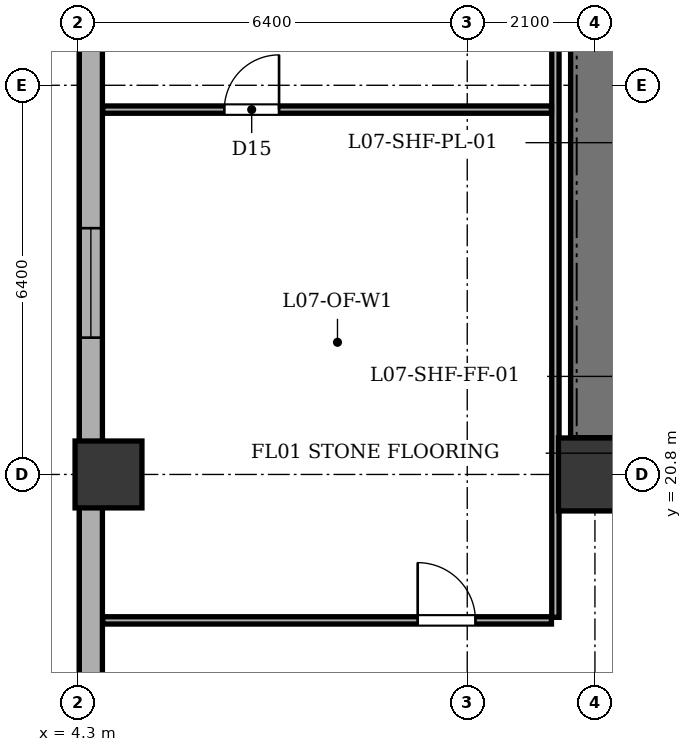
"""IFC4 building model, lengths in metres.
Left out: names, types, materials, properties, quantities, classifications, styles, units other than length and angle.
Written with IfcOpenShell. Run it as: python <this file> out.ifc"""

import sys

from ifc_helpers import new_model, si_unit, direction, frame, frame_2d, origin, origin_2d, place, context, subcontext, project, spatial, rectangle, extrude, element, fill, save


model = new_model("IFC4")
c1 = context("Model", 3, precision=1e-05, world=origin(), true_north=direction((0.0, 1.0)))
c2 = subcontext(c1, "Body", "Model", "MODEL_VIEW")
j1 = project(units=[si_unit("LENGTHUNIT", "METRE"), si_unit("PLANEANGLEUNIT", "RADIAN")], contexts=[c1])
p1 = place(None, origin())
s1 = spatial("IfcSite", under=j1, at=p1, CompositionType="ELEMENT")
p2 = place(p1, origin())
s2 = spatial("IfcBuilding", under=s1, at=p2, CompositionType="ELEMENT")
p3 = place(p2, frame((0.0, 0.0, 32.1)))
s3 = spatial("IfcBuildingStorey", under=s2, at=p3, CompositionType="ELEMENT", Elevation=32.1)
p4 = place(p3, frame((12.8, 20.8, 0.0), z_axis=(0.0, 0.0, 1.0), x_axis=(1.0, 0.0, 0.0)))
e1 = element("IfcColumn", 1, at=p4, inside=s3, PredefinedType="COLUMN", context=c2, shape_type="SweptSolid", body=[
    extrude(rectangle(XDim=1.2, YDim=1.2, at=origin_2d()), origin(), (0.0, 0.0, 1.0), 3.9),
])
p5 = place(p3, frame((4.8, 20.8, 0.0), z_axis=(0.0, 0.0, 1.0), x_axis=(1.0, 0.0, 0.0)))
e2 = element("IfcColumn", 2, at=p5, inside=s3, PredefinedType="COLUMN", context=c2, shape_type="SweptSolid", body=[
    extrude(rectangle(XDim=1.1, YDim=1.1, at=origin_2d()), origin(), (0.0, 0.0, 1.0), 3.9),
])
p6 = place(p3, frame((4.51, 6.5, 0.0), z_axis=(0.0, 0.0, 1.0), x_axis=(0.0, 1.0, 0.0)))
e3 = element("IfcWall", 3, at=p6, inside=s3, PredefinedType="STANDARD", context=c2, shape_type="SweptSolid", body=[
    extrude(rectangle(XDim=35.0, YDim=0.38, at=frame_2d((17.5, 0.0))), origin(), (0.0, 0.0, 1.0), 3.135),
])
p7 = place(p6, frame((2.693, 0.0, 0.8)))
e4 = element("IfcOpeningElement", 4, at=p7, cuts=e3, PredefinedType="OPENING", context=c2, shape_type="SweptSolid", body=[
    extrude(rectangle(XDim=1.8, YDim=1.9, at=frame_2d((0.9, 0.95))), frame((0.0, 0.2, 0.0), z_axis=(0.0, -1.0, 0.0), x_axis=(1.0, 0.0, 0.0)), (0.0, 0.0, 1.0), 0.4),
])
p8 = place(p6, frame((7.457, 0.0, 0.8)))
e5 = element("IfcOpeningElement", 5, at=p8, cuts=e3, PredefinedType="OPENING", context=c2, shape_type="SweptSolid", body=[
    extrude(rectangle(XDim=2.4, YDim=1.9, at=frame_2d((1.2, 0.95))), frame((0.0, 0.2, 0.0), z_axis=(0.0, -1.0, 0.0), x_axis=(1.0, 0.0, 0.0)), (0.0, 0.0, 1.0), 0.4),
])
p9 = place(p6, frame((16.55, 0.0, 0.8)))
e6 = element("IfcOpeningElement", 6, at=p9, cuts=e3, PredefinedType="OPENING", context=c2, shape_type="SweptSolid", body=[
    extrude(rectangle(XDim=1.8, YDim=1.9, at=frame_2d((0.9, 0.95))), frame((0.0, 0.2, 0.0), z_axis=(0.0, -1.0, 0.0), x_axis=(1.0, 0.0, 0.0)), (0.0, 0.0, 1.0), 0.4),
])
p10 = place(p6, frame((21.33, 0.0, 0.8)))
e7 = element("IfcOpeningElement", 7, at=p10, cuts=e3, PredefinedType="OPENING", context=c2, shape_type="SweptSolid", body=[
    extrude(rectangle(XDim=1.8, YDim=1.9, at=frame_2d((0.9, 0.95))), frame((0.0, 0.2, 0.0), z_axis=(0.0, -1.0, 0.0), x_axis=(1.0, 0.0, 0.0)), (0.0, 0.0, 1.0), 0.4),
])
p11 = place(p6, frame((23.97, 0.0, 0.8)))
e8 = element("IfcOpeningElement", 8, at=p11, cuts=e3, PredefinedType="OPENING", context=c2, shape_type="SweptSolid", body=[
    extrude(rectangle(XDim=1.8, YDim=1.9, at=frame_2d((0.9, 0.95))), frame((0.0, 0.2, 0.0), z_axis=(0.0, -1.0, 0.0), x_axis=(1.0, 0.0, 0.0)), (0.0, 0.0, 1.0), 0.4),
])
p12 = place(p6, frame((31.175, 0.0, 0.8)))
e9 = element("IfcOpeningElement", 9, at=p12, cuts=e3, PredefinedType="OPENING", context=c2, shape_type="SweptSolid", body=[
    extrude(rectangle(XDim=1.8, YDim=1.9, at=frame_2d((0.9, 0.95))), frame((0.0, 0.2, 0.0), z_axis=(0.0, -1.0, 0.0), x_axis=(1.0, 0.0, 0.0)), (0.0, 0.0, 1.0), 0.4),
])
p13 = place(p3, frame((12.8, 21.405, 0.0), z_axis=(0.0, 0.0, 1.0), x_axis=(0.0, 1.0, 0.0)))
e10 = element("IfcWall", 10, at=p13, inside=s3, PredefinedType="SHEAR", context=c2, shape_type="SweptSolid", body=[
    extrude(rectangle(XDim=11.59, YDim=0.8, at=frame_2d((5.795, 0.0))), origin(), (0.0, 0.0, 1.0), 3.6),
])
p14 = place(p3, frame((12.15, 18.45, 0.0), z_axis=(0.0, 0.0, 1.0), x_axis=(0.0, 1.0, 0.0)))
e11 = element("IfcWall", 11, at=p14, inside=s3, PredefinedType="PARTITIONING", context=c2, shape_type="SweptSolid", body=[
    extrude(rectangle(XDim=17.5, YDim=0.12, at=frame_2d((8.75, 0.0))), origin(), (0.0, 0.0, 1.0), 3.6),
])
p15 = place(p3, frame((4.705, 18.4, 0.0), z_axis=(0.0, 0.0, 1.0), x_axis=(1.0, 0.0, 0.0)))
e12 = element("IfcWall", 12, at=p15, inside=s3, PredefinedType="PARTITIONING", context=c2, shape_type="SweptSolid", body=[
    extrude(rectangle(XDim=7.38, YDim=0.12, at=frame_2d((3.69, 0.0))), origin(), (0.0, 0.0, 1.0), 3.6),
])
p16 = place(p15, frame((5.18, 0.0, 0.0)))
e13 = element("IfcOpeningElement", 13, at=p16, cuts=e12, PredefinedType="OPENING", context=c2, shape_type="SweptSolid", body=[
    extrude(rectangle(XDim=0.95, YDim=2.1, at=frame_2d((0.475, 1.05))), frame((0.0, 0.07, 0.0), z_axis=(0.0, -1.0, 0.0), x_axis=(1.0, 0.0, 0.0)), (0.0, 0.0, 1.0), 0.14),
])
p17 = place(p3, frame((4.705, 26.8, 0.0), z_axis=(0.0, 0.0, 1.0), x_axis=(1.0, 0.0, 0.0)))
e14 = element("IfcWall", 14, at=p17, inside=s3, PredefinedType="PARTITIONING", context=c2, shape_type="SweptSolid", body=[
    extrude(rectangle(XDim=7.38, YDim=0.12, at=frame_2d((3.69, 0.0))), origin(), (0.0, 0.0, 1.0), 3.6),
])
p18 = place(p17, frame((2.0, 0.0, 0.0)))
e15 = element("IfcOpeningElement", 15, at=p18, cuts=e14, PredefinedType="OPENING", context=c2, shape_type="SweptSolid", body=[
    extrude(rectangle(XDim=0.9, YDim=2.05, at=frame_2d((0.45, 1.025))), frame((0.0, 0.07, 0.0), z_axis=(0.0, -1.0, 0.0), x_axis=(1.0, 0.0, 0.0)), (0.0, 0.0, 1.0), 0.14),
])
p19 = place(p9, origin())
e16 = element("IfcWindow", 16, at=p19, inside=s3, PartitioningType="SINGLE_PANEL", PredefinedType="WINDOW", context=c2, shape_type="SweptSolid", body=[
    extrude(rectangle(XDim=1.8, YDim=1.9, at=frame_2d((0.9, 0.95))), frame((0.0, -0.01, 0.0), z_axis=(0.0, -1.0, 0.0), x_axis=(1.0, 0.0, 0.0)), (0.0, 0.0, 1.0), 0.06),
])
fill(e6, e16)
p20 = place(p18, origin())
e17 = element("IfcDoor", 17, at=p20, inside=s3, OperationType="SINGLE_SWING_RIGHT", PredefinedType="DOOR", context=c2, shape_type="SweptSolid", body=[
    extrude(rectangle(XDim=0.9, YDim=2.05, at=frame_2d((0.45, 1.025))), frame((0.0, 0.025, 0.0), z_axis=(0.0, -1.0, 0.0), x_axis=(1.0, 0.0, 0.0)), (0.0, 0.0, 1.0), 0.05),
])
fill(e15, e17)
p21 = place(p16, origin())
e18 = element("IfcDoor", 18, at=p21, inside=s3, OperationType="SINGLE_SWING_LEFT", PredefinedType="DOOR", context=c2, shape_type="SweptSolid", body=[
    extrude(rectangle(XDim=0.95, YDim=2.1, at=frame_2d((0.475, 1.05))), frame((0.0, 0.025, 0.0), z_axis=(0.0, -1.0, 0.0), x_axis=(1.0, 0.0, 0.0)), (0.0, 0.0, 1.0), 0.05),
])
fill(e13, e18)
save(model, sys.argv[1])
